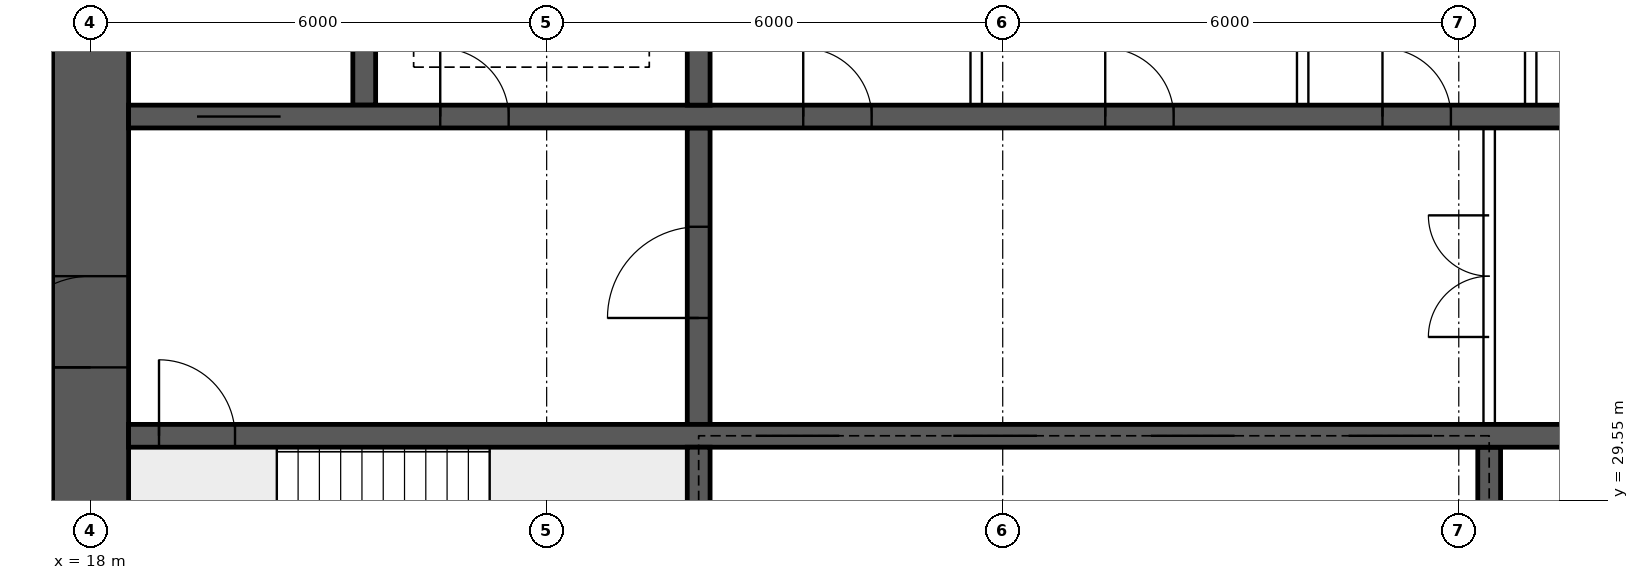
"""IFC4 building model, lengths in metres.
Left out: names, types, materials, properties, quantities, classifications, styles, units other than length and angle.
Written with IfcOpenShell. Run it as: python <this file> out.ifc"""

import sys

from ifc_helpers import new_model, si_unit, direction, frame, frame_2d, origin, place, context, subcontext, project, spatial, rectangle, extrude, element, fill, save


model = new_model("IFC4")
c1 = context("Model", 3, precision=1e-05, world=origin(), true_north=direction((0.0, 1.0)))
c2 = subcontext(c1, "Body", "Model", "MODEL_VIEW")
j1 = project(units=[si_unit("LENGTHUNIT", "METRE"), si_unit("PLANEANGLEUNIT", "RADIAN")], contexts=[c1])
p1 = place(None, origin())
s1 = spatial("IfcSite", under=j1, at=p1, CompositionType="ELEMENT")
p2 = place(p1, origin())
s2 = spatial("IfcBuilding", under=s1, at=p2, CompositionType="ELEMENT")
p3 = place(p2, frame((0.0, 0.0, 65.2)))
s3 = spatial("IfcBuildingStorey", under=s2, at=p3, CompositionType="ELEMENT", Elevation=65.2)
p4 = place(p3, frame((18.0, 26.3, 0.0), z_axis=(0.0, 0.0, 1.0), x_axis=(0.0, 1.0, 0.0)))
e1 = element("IfcWall", 1, at=p4, inside=s3, PredefinedType="SHEAR", context=c2, shape_type="SweptSolid", body=[
    extrude(rectangle(XDim=11.4, YDim=1.0, at=frame_2d((5.7, 0.0))), origin(), (0.0, 0.0, 1.0), 3.75),
])
p5 = place(p4, frame((5.0, 0.0, 0.0)))
e2 = element("IfcOpeningElement", 2, at=p5, cuts=e1, PredefinedType="OPENING", context=c2, shape_type="SweptSolid", body=[
    extrude(rectangle(XDim=1.2, YDim=2.1, at=frame_2d((0.6, 1.05))), frame((0.0, 0.51, 0.0), z_axis=(0.0, -1.0, 0.0), x_axis=(1.0, 0.0, 0.0)), (0.0, 0.0, 1.0), 1.02),
])
p6 = place(p3, frame((18.5, 30.4, 0.0), z_axis=(0.0, 0.0, 1.0), x_axis=(1.0, 0.0, 0.0)))
e3 = element("IfcWall", 3, at=p6, inside=s3, PredefinedType="SHEAR", context=c2, shape_type="SweptSolid", body=[
    extrude(rectangle(XDim=47.0, YDim=0.3, at=frame_2d((23.5, 0.0))), origin(), (0.0, 0.0, 1.0), 3.75),
])
p7 = place(p6, frame((0.4, 0.0, 0.0)))
e4 = element("IfcOpeningElement", 4, at=p7, cuts=e3, PredefinedType="OPENING", context=c2, shape_type="SweptSolid", body=[
    extrude(rectangle(XDim=1.0, YDim=2.1, at=frame_2d((0.5, 1.05))), frame((0.0, 0.16, 0.0), z_axis=(0.0, -1.0, 0.0), x_axis=(1.0, 0.0, 0.0)), (0.0, 0.0, 1.0), 0.32),
])
p8 = place(p6, frame((45.6, 0.0, 0.0)))
e5 = element("IfcOpeningElement", 5, at=p8, cuts=e3, PredefinedType="OPENING", context=c2, shape_type="SweptSolid", body=[
    extrude(rectangle(XDim=1.0, YDim=2.1, at=frame_2d((0.5, 1.05))), frame((0.0, 0.16, 0.0), z_axis=(0.0, -1.0, 0.0), x_axis=(1.0, 0.0, 0.0)), (0.0, 0.0, 1.0), 0.32),
])
p9 = place(p6, frame((8.25, 0.0, 0.0)))
e6 = element("IfcOpeningElement", 6, at=p9, cuts=e3, PredefinedType="OPENING", context=c2, shape_type="SweptSolid", body=[
    extrude(rectangle(XDim=1.1, YDim=2.1, at=frame_2d((0.55, 1.05))), frame((0.0, 0.16, 0.0), z_axis=(0.0, -1.0, 0.0), x_axis=(1.0, 0.0, 0.0)), (0.0, 0.0, 1.0), 0.32),
])
p10 = place(p6, frame((10.85, 0.0, 0.0)))
e7 = element("IfcOpeningElement", 7, at=p10, cuts=e3, PredefinedType="OPENING", context=c2, shape_type="SweptSolid", body=[
    extrude(rectangle(XDim=1.1, YDim=2.1, at=frame_2d((0.55, 1.05))), frame((0.0, 0.16, 0.0), z_axis=(0.0, -1.0, 0.0), x_axis=(1.0, 0.0, 0.0)), (0.0, 0.0, 1.0), 0.32),
])
p11 = place(p6, frame((13.45, 0.0, 0.0)))
e8 = element("IfcOpeningElement", 8, at=p11, cuts=e3, PredefinedType="OPENING", context=c2, shape_type="SweptSolid", body=[
    extrude(rectangle(XDim=1.1, YDim=2.1, at=frame_2d((0.55, 1.05))), frame((0.0, 0.16, 0.0), z_axis=(0.0, -1.0, 0.0), x_axis=(1.0, 0.0, 0.0)), (0.0, 0.0, 1.0), 0.32),
])
p12 = place(p6, frame((16.05, 0.0, 0.0)))
e9 = element("IfcOpeningElement", 9, at=p12, cuts=e3, PredefinedType="OPENING", context=c2, shape_type="SweptSolid", body=[
    extrude(rectangle(XDim=1.1, YDim=2.1, at=frame_2d((0.55, 1.05))), frame((0.0, 0.16, 0.0), z_axis=(0.0, -1.0, 0.0), x_axis=(1.0, 0.0, 0.0)), (0.0, 0.0, 1.0), 0.32),
])
p13 = place(p6, frame((30.117, 0.0, 0.0)))
e10 = element("IfcOpeningElement", 10, at=p13, cuts=e3, PredefinedType="OPENING", context=c2, shape_type="SweptSolid", body=[
    extrude(rectangle(XDim=1.1, YDim=2.1, at=frame_2d((0.55, 1.05))), frame((0.0, 0.16, 0.0), z_axis=(0.0, -1.0, 0.0), x_axis=(1.0, 0.0, 0.0)), (0.0, 0.0, 1.0), 0.32),
])
p14 = place(p6, frame((33.65, 0.0, 0.0)))
e11 = element("IfcOpeningElement", 11, at=p14, cuts=e3, PredefinedType="OPENING", context=c2, shape_type="SweptSolid", body=[
    extrude(rectangle(XDim=1.1, YDim=2.1, at=frame_2d((0.55, 1.05))), frame((0.0, 0.16, 0.0), z_axis=(0.0, -1.0, 0.0), x_axis=(1.0, 0.0, 0.0)), (0.0, 0.0, 1.0), 0.32),
])
p15 = place(p6, frame((37.183, 0.0, 0.0)))
e12 = element("IfcOpeningElement", 12, at=p15, cuts=e3, PredefinedType="OPENING", context=c2, shape_type="SweptSolid", body=[
    extrude(rectangle(XDim=1.1, YDim=2.1, at=frame_2d((0.55, 1.05))), frame((0.0, 0.16, 0.0), z_axis=(0.0, -1.0, 0.0), x_axis=(1.0, 0.0, 0.0)), (0.0, 0.0, 1.0), 0.32),
])
p16 = place(p3, frame((18.5, 34.6, 0.0), z_axis=(0.0, 0.0, 1.0), x_axis=(1.0, 0.0, 0.0)))
e13 = element("IfcWall", 13, at=p16, inside=s3, PredefinedType="SHEAR", context=c2, shape_type="SweptSolid", body=[
    extrude(rectangle(XDim=47.0, YDim=0.3, at=frame_2d((23.5, 0.0))), origin(), (0.0, 0.0, 1.0), 3.75),
])
p17 = place(p16, frame((0.9, 0.0, 0.0)))
e14 = element("IfcOpeningElement", 14, at=p17, cuts=e13, PredefinedType="OPENING", context=c2, shape_type="SweptSolid", body=[
    extrude(rectangle(XDim=1.1, YDim=2.1, at=frame_2d((0.55, 1.05))), frame((0.0, 0.16, 0.0), z_axis=(0.0, -1.0, 0.0), x_axis=(1.0, 0.0, 0.0)), (0.0, 0.0, 1.0), 0.32),
])
p18 = place(p16, frame((45.0, 0.0, 0.0)))
e15 = element("IfcOpeningElement", 15, at=p18, cuts=e13, PredefinedType="OPENING", context=c2, shape_type="SweptSolid", body=[
    extrude(rectangle(XDim=1.1, YDim=2.1, at=frame_2d((0.55, 1.05))), frame((0.0, 0.16, 0.0), z_axis=(0.0, -1.0, 0.0), x_axis=(1.0, 0.0, 0.0)), (0.0, 0.0, 1.0), 0.32),
])
p19 = place(p16, frame((4.1, 0.0, 0.0)))
e16 = element("IfcOpeningElement", 16, at=p19, cuts=e13, PredefinedType="OPENING", context=c2, shape_type="SweptSolid", body=[
    extrude(rectangle(XDim=0.9, YDim=2.1, at=frame_2d((0.45, 1.05))), frame((0.0, 0.16, 0.0), z_axis=(0.0, -1.0, 0.0), x_axis=(1.0, 0.0, 0.0)), (0.0, 0.0, 1.0), 0.32),
])
p20 = place(p16, frame((42.0, 0.0, 0.0)))
e17 = element("IfcOpeningElement", 17, at=p20, cuts=e13, PredefinedType="OPENING", context=c2, shape_type="SweptSolid", body=[
    extrude(rectangle(XDim=0.9, YDim=2.1, at=frame_2d((0.45, 1.05))), frame((0.0, 0.16, 0.0), z_axis=(0.0, -1.0, 0.0), x_axis=(1.0, 0.0, 0.0)), (0.0, 0.0, 1.0), 0.32),
])
p21 = place(p16, frame((8.875, 0.0, 0.0)))
e18 = element("IfcOpeningElement", 18, at=p21, cuts=e13, PredefinedType="OPENING", context=c2, shape_type="SweptSolid", body=[
    extrude(rectangle(XDim=0.9, YDim=2.1, at=frame_2d((0.45, 1.05))), frame((0.0, 0.16, 0.0), z_axis=(0.0, -1.0, 0.0), x_axis=(1.0, 0.0, 0.0)), (0.0, 0.0, 1.0), 0.32),
])
p22 = place(p16, frame((12.849, 0.0, 0.0)))
e19 = element("IfcOpeningElement", 19, at=p22, cuts=e13, PredefinedType="OPENING", context=c2, shape_type="SweptSolid", body=[
    extrude(rectangle(XDim=0.9, YDim=2.1, at=frame_2d((0.45, 1.05))), frame((0.0, 0.16, 0.0), z_axis=(0.0, -1.0, 0.0), x_axis=(1.0, 0.0, 0.0)), (0.0, 0.0, 1.0), 0.32),
])
p23 = place(p16, frame((16.496, 0.0, 0.0)))
e20 = element("IfcOpeningElement", 20, at=p23, cuts=e13, PredefinedType="OPENING", context=c2, shape_type="SweptSolid", body=[
    extrude(rectangle(XDim=0.9, YDim=2.1, at=frame_2d((0.45, 1.05))), frame((0.0, 0.16, 0.0), z_axis=(0.0, -1.0, 0.0), x_axis=(1.0, 0.0, 0.0)), (0.0, 0.0, 1.0), 0.32),
])
p24 = place(p16, frame((20.255, 0.0, 0.0)))
e21 = element("IfcOpeningElement", 21, at=p24, cuts=e13, PredefinedType="OPENING", context=c2, shape_type="SweptSolid", body=[
    extrude(rectangle(XDim=0.9, YDim=2.1, at=frame_2d((0.45, 1.05))), frame((0.0, 0.16, 0.0), z_axis=(0.0, -1.0, 0.0), x_axis=(1.0, 0.0, 0.0)), (0.0, 0.0, 1.0), 0.32),
])
p25 = place(p16, frame((24.661, 0.0, 0.0)))
e22 = element("IfcOpeningElement", 22, at=p25, cuts=e13, PredefinedType="OPENING", context=c2, shape_type="SweptSolid", body=[
    extrude(rectangle(XDim=0.9, YDim=2.1, at=frame_2d((0.45, 1.05))), frame((0.0, 0.16, 0.0), z_axis=(0.0, -1.0, 0.0), x_axis=(1.0, 0.0, 0.0)), (0.0, 0.0, 1.0), 0.32),
])
p26 = place(p16, frame((27.458, 0.0, 0.0)))
e23 = element("IfcOpeningElement", 23, at=p26, cuts=e13, PredefinedType="OPENING", context=c2, shape_type="SweptSolid", body=[
    extrude(rectangle(XDim=0.9, YDim=2.1, at=frame_2d((0.45, 1.05))), frame((0.0, 0.16, 0.0), z_axis=(0.0, -1.0, 0.0), x_axis=(1.0, 0.0, 0.0)), (0.0, 0.0, 1.0), 0.32),
])
p27 = place(p16, frame((29.831, 0.0, 0.0)))
e24 = element("IfcOpeningElement", 24, at=p27, cuts=e13, PredefinedType="OPENING", context=c2, shape_type="SweptSolid", body=[
    extrude(rectangle(XDim=0.9, YDim=2.1, at=frame_2d((0.45, 1.05))), frame((0.0, 0.16, 0.0), z_axis=(0.0, -1.0, 0.0), x_axis=(1.0, 0.0, 0.0)), (0.0, 0.0, 1.0), 0.32),
])
p28 = place(p16, frame((33.68, 0.0, 0.0)))
e25 = element("IfcOpeningElement", 25, at=p28, cuts=e13, PredefinedType="OPENING", context=c2, shape_type="SweptSolid", body=[
    extrude(rectangle(XDim=0.9, YDim=2.1, at=frame_2d((0.45, 1.05))), frame((0.0, 0.16, 0.0), z_axis=(0.0, -1.0, 0.0), x_axis=(1.0, 0.0, 0.0)), (0.0, 0.0, 1.0), 0.32),
])
p29 = place(p16, frame((37.429, 0.0, 0.0)))
e26 = element("IfcOpeningElement", 26, at=p29, cuts=e13, PredefinedType="OPENING", context=c2, shape_type="SweptSolid", body=[
    extrude(rectangle(XDim=0.9, YDim=2.1, at=frame_2d((0.45, 1.05))), frame((0.0, 0.16, 0.0), z_axis=(0.0, -1.0, 0.0), x_axis=(1.0, 0.0, 0.0)), (0.0, 0.0, 1.0), 0.32),
])
p30 = place(p3, frame((26.0, 26.3, 0.0), z_axis=(0.0, 0.0, 1.0), x_axis=(0.0, 1.0, 0.0)))
e27 = element("IfcWall", 27, at=p30, inside=s3, PredefinedType="SHEAR", context=c2, shape_type="SweptSolid", body=[
    extrude(rectangle(XDim=3.95, YDim=0.3, at=frame_2d((1.975, 0.0))), origin(), (0.0, 0.0, 1.0), 3.75),
])
p31 = place(p3, frame((26.0, 30.55, 0.0), z_axis=(0.0, 0.0, 1.0), x_axis=(0.0, 1.0, 0.0)))
e28 = element("IfcWall", 28, at=p31, inside=s3, PredefinedType="SHEAR", context=c2, shape_type="SweptSolid", body=[
    extrude(rectangle(XDim=3.9, YDim=0.3, at=frame_2d((1.95, 0.0))), origin(), (0.0, 0.0, 1.0), 3.75),
])
p32 = place(p31, frame((1.4, 0.0, 0.0)))
e29 = element("IfcOpeningElement", 29, at=p32, cuts=e28, PredefinedType="OPENING", context=c2, shape_type="SweptSolid", body=[
    extrude(rectangle(XDim=1.2, YDim=2.1, at=frame_2d((0.6, 1.05))), frame((0.0, 0.16, 0.0), z_axis=(0.0, -1.0, 0.0), x_axis=(1.0, 0.0, 0.0)), (0.0, 0.0, 1.0), 0.32),
])
for number, where, z_axis, x_axis in (
    (30, (21.6, 34.75, 0.0), (0.0, 0.0, 1.0), (0.0, 1.0, 0.0)),
    (31, (26.0, 34.75, 0.0), (0.0, 0.0, 1.0), (0.0, 1.0, 0.0)),
):
    element("IfcWall", number, at=place(p3, frame(where, z_axis=z_axis, x_axis=x_axis)), inside=s3, PredefinedType="SHEAR", context=c2, shape_type="SweptSolid", body=[
        extrude(rectangle(XDim=2.95, YDim=0.3, at=frame_2d((1.475, 0.0))), origin(), (0.0, 0.0, 1.0), 3.75),
    ])
p33 = place(p3, frame((36.4, 26.3, 0.0), z_axis=(0.0, 0.0, 1.0), x_axis=(0.0, 1.0, 0.0)))
e32 = element("IfcWall", 32, at=p33, inside=s3, PredefinedType="SHEAR", context=c2, shape_type="SweptSolid", body=[
    extrude(rectangle(XDim=3.95, YDim=0.3, at=frame_2d((1.975, 0.0))), origin(), (0.0, 0.0, 1.0), 3.75),
])
p34 = place(p3, frame((36.4, 30.55, 0.0), z_axis=(0.0, 0.0, 1.0), x_axis=(0.0, 1.0, 0.0)))
e33 = element("IfcWall", 33, at=p34, inside=s3, PredefinedType="SOLIDWALL", context=c2, shape_type="SweptSolid", body=[
    extrude(rectangle(XDim=3.9, YDim=0.15, at=frame_2d((1.95, 0.0))), origin(), (0.0, 0.0, 1.0), 3.4),
])
p35 = place(p34, frame((1.15, 0.0, 0.0)))
e34 = element("IfcOpeningElement", 34, at=p35, cuts=e33, PredefinedType="OPENING", context=c2, shape_type="SweptSolid", body=[
    extrude(rectangle(XDim=1.6, YDim=2.1, at=frame_2d((0.8, 1.05))), frame((0.0, 0.085, 0.0), z_axis=(0.0, -1.0, 0.0), x_axis=(1.0, 0.0, 0.0)), (0.0, 0.0, 1.0), 0.17),
])
for number, where, z_axis, x_axis in (
    (35, (29.651, 34.75, 0.0), (0.0, 0.0, 1.0), (0.0, 1.0, 0.0)),
    (36, (33.946, 34.75, 0.0), (0.0, 0.0, 1.0), (0.0, 1.0, 0.0)),
    (37, (36.946, 34.75, 0.0), (0.0, 0.0, 1.0), (0.0, 1.0, 0.0)),
):
    element("IfcWall", number, at=place(p3, frame(where, z_axis=z_axis, x_axis=x_axis)), inside=s3, PredefinedType="SOLIDWALL", context=c2, shape_type="SweptSolid", body=[
        extrude(rectangle(XDim=2.95, YDim=0.15, at=frame_2d((1.475, 0.0))), origin(), (0.0, 0.0, 1.0), 3.4),
    ])
p36 = place(p35, origin())
e38 = element("IfcDoor", 38, at=p36, inside=s3, OperationType="DOUBLE_DOOR_SINGLE_SWING", PredefinedType="DOOR", context=c2, shape_type="SweptSolid", body=[
    extrude(rectangle(XDim=1.6, YDim=2.1, at=frame_2d((0.8, 1.05))), frame((0.0, 0.025, 0.0), z_axis=(0.0, -1.0, 0.0), x_axis=(1.0, 0.0, 0.0)), (0.0, 0.0, 1.0), 0.05),
])
fill(e34, e38)
p37 = place(p5, origin())
e39 = element("IfcDoor", 39, at=p37, inside=s3, OperationType="SINGLE_SWING_LEFT", PredefinedType="DOOR", context=c2, shape_type="SweptSolid", body=[
    extrude(rectangle(XDim=1.2, YDim=2.1, at=frame_2d((0.6, 1.05))), frame((0.0, 0.025, 0.0), z_axis=(0.0, -1.0, 0.0), x_axis=(1.0, 0.0, 0.0)), (0.0, 0.0, 1.0), 0.05),
])
fill(e2, e39)
p38 = place(p7, origin())
e40 = element("IfcDoor", 40, at=p38, inside=s3, OperationType="SINGLE_SWING_LEFT", PredefinedType="DOOR", context=c2, shape_type="SweptSolid", body=[
    extrude(rectangle(XDim=1.0, YDim=2.1, at=frame_2d((0.5, 1.05))), frame((0.0, 0.025, 0.0), z_axis=(0.0, -1.0, 0.0), x_axis=(1.0, 0.0, 0.0)), (0.0, 0.0, 1.0), 0.05),
])
fill(e4, e40)
p39 = place(p17, origin())
e41 = element("IfcDoor", 41, at=p39, inside=s3, OperationType="DOUBLE_DOOR_SLIDING", PredefinedType="DOOR", context=c2, shape_type="SweptSolid", body=[
    extrude(rectangle(XDim=1.1, YDim=2.1, at=frame_2d((0.55, 1.05))), frame((0.0, 0.025, 0.0), z_axis=(0.0, -1.0, 0.0), x_axis=(1.0, 0.0, 0.0)), (0.0, 0.0, 1.0), 0.05),
])
fill(e14, e41)
p40 = place(p19, origin())
e42 = element("IfcDoor", 42, at=p40, inside=s3, OperationType="SINGLE_SWING_LEFT", PredefinedType="DOOR", context=c2, shape_type="SweptSolid", body=[
    extrude(rectangle(XDim=0.9, YDim=2.1, at=frame_2d((0.45, 1.05))), frame((0.0, 0.025, 0.0), z_axis=(0.0, -1.0, 0.0), x_axis=(1.0, 0.0, 0.0)), (0.0, 0.0, 1.0), 0.05),
])
fill(e16, e42)
p41 = place(p32, origin())
e43 = element("IfcDoor", 43, at=p41, inside=s3, OperationType="SINGLE_SWING_LEFT", PredefinedType="DOOR", context=c2, shape_type="SweptSolid", body=[
    extrude(rectangle(XDim=1.2, YDim=2.1, at=frame_2d((0.6, 1.05))), frame((0.0, 0.025, 0.0), z_axis=(0.0, -1.0, 0.0), x_axis=(1.0, 0.0, 0.0)), (0.0, 0.0, 1.0), 0.05),
])
fill(e29, e43)
p42 = place(p21, origin())
e44 = element("IfcDoor", 44, at=p42, inside=s3, OperationType="SINGLE_SWING_LEFT", PredefinedType="DOOR", context=c2, shape_type="SweptSolid", body=[
    extrude(rectangle(XDim=0.9, YDim=2.1, at=frame_2d((0.45, 1.05))), frame((0.0, 0.025, 0.0), z_axis=(0.0, -1.0, 0.0), x_axis=(1.0, 0.0, 0.0)), (0.0, 0.0, 1.0), 0.05),
])
fill(e18, e44)
p43 = place(p22, origin())
e45 = element("IfcDoor", 45, at=p43, inside=s3, OperationType="SINGLE_SWING_LEFT", PredefinedType="DOOR", context=c2, shape_type="SweptSolid", body=[
    extrude(rectangle(XDim=0.9, YDim=2.1, at=frame_2d((0.45, 1.05))), frame((0.0, 0.025, 0.0), z_axis=(0.0, -1.0, 0.0), x_axis=(1.0, 0.0, 0.0)), (0.0, 0.0, 1.0), 0.05),
])
fill(e19, e45)
p44 = place(p23, origin())
e46 = element("IfcDoor", 46, at=p44, inside=s3, OperationType="SINGLE_SWING_LEFT", PredefinedType="DOOR", context=c2, shape_type="SweptSolid", body=[
    extrude(rectangle(XDim=0.9, YDim=2.1, at=frame_2d((0.45, 1.05))), frame((0.0, 0.025, 0.0), z_axis=(0.0, -1.0, 0.0), x_axis=(1.0, 0.0, 0.0)), (0.0, 0.0, 1.0), 0.05),
])
fill(e20, e46)
p45 = place(p9, origin())
e47 = element("IfcDoor", 47, at=p45, inside=s3, OperationType="DOUBLE_DOOR_SLIDING", PredefinedType="DOOR", context=c2, shape_type="SweptSolid", body=[
    extrude(rectangle(XDim=1.1, YDim=2.1, at=frame_2d((0.55, 1.05))), frame((0.0, 0.025, 0.0), z_axis=(0.0, -1.0, 0.0), x_axis=(1.0, 0.0, 0.0)), (0.0, 0.0, 1.0), 0.05),
])
fill(e6, e47)
p46 = place(p10, origin())
e48 = element("IfcDoor", 48, at=p46, inside=s3, OperationType="DOUBLE_DOOR_SLIDING", PredefinedType="DOOR", context=c2, shape_type="SweptSolid", body=[
    extrude(rectangle(XDim=1.1, YDim=2.1, at=frame_2d((0.55, 1.05))), frame((0.0, 0.025, 0.0), z_axis=(0.0, -1.0, 0.0), x_axis=(1.0, 0.0, 0.0)), (0.0, 0.0, 1.0), 0.05),
])
fill(e7, e48)
p47 = place(p11, origin())
e49 = element("IfcDoor", 49, at=p47, inside=s3, OperationType="DOUBLE_DOOR_SLIDING", PredefinedType="DOOR", context=c2, shape_type="SweptSolid", body=[
    extrude(rectangle(XDim=1.1, YDim=2.1, at=frame_2d((0.55, 1.05))), frame((0.0, 0.025, 0.0), z_axis=(0.0, -1.0, 0.0), x_axis=(1.0, 0.0, 0.0)), (0.0, 0.0, 1.0), 0.05),
])
fill(e8, e49)
p48 = place(p12, origin())
e50 = element("IfcDoor", 50, at=p48, inside=s3, OperationType="DOUBLE_DOOR_SLIDING", PredefinedType="DOOR", context=c2, shape_type="SweptSolid", body=[
    extrude(rectangle(XDim=1.1, YDim=2.1, at=frame_2d((0.55, 1.05))), frame((0.0, 0.025, 0.0), z_axis=(0.0, -1.0, 0.0), x_axis=(1.0, 0.0, 0.0)), (0.0, 0.0, 1.0), 0.05),
])
fill(e9, e50)
save(model, sys.argv[1])
